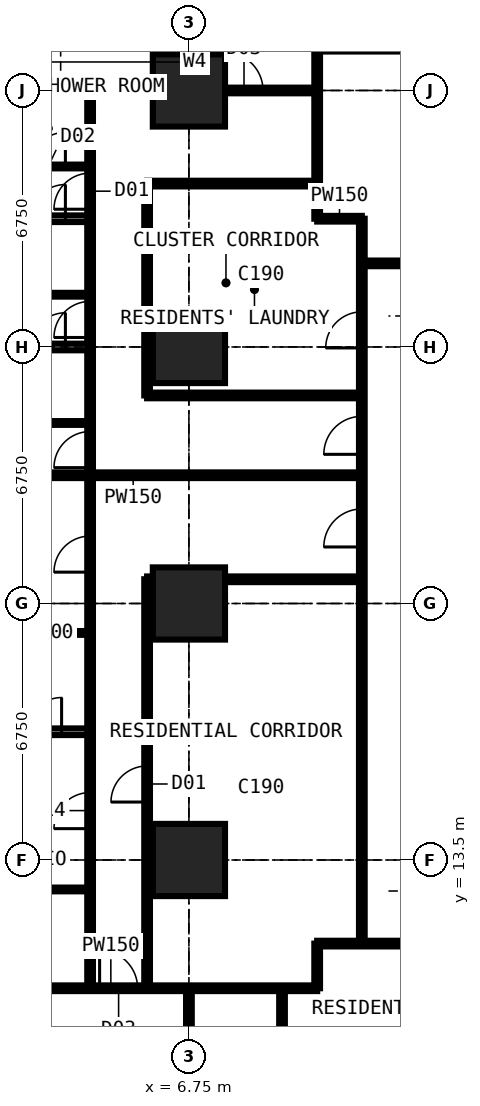
"""IFC4 building model, lengths in metres.
Left out: names, types, materials, properties, quantities, classifications, styles, units other than length and angle.
Written with IfcOpenShell. Run it as: python <this file> out.ifc"""

import sys

from ifc_helpers import new_model, si_unit, direction, frame, frame_2d, origin, origin_2d, place, context, subcontext, project, spatial, rectangle, extrude, element, fill, save


model = new_model("IFC4")
c1 = context("Model", 3, precision=1e-05, world=origin(), true_north=direction((0.0, 1.0)))
c2 = subcontext(c1, "Body", "Model", "MODEL_VIEW")
j1 = project(units=[si_unit("LENGTHUNIT", "METRE"), si_unit("PLANEANGLEUNIT", "RADIAN")], contexts=[c1])
p1 = place(None, origin())
s1 = spatial("IfcSite", under=j1, at=p1, CompositionType="ELEMENT")
p2 = place(p1, origin())
s2 = spatial("IfcBuilding", under=s1, at=p2, CompositionType="ELEMENT")
p3 = place(p2, frame((0.0, 0.0, 43.2)))
s3 = spatial("IfcBuildingStorey", under=s2, at=p3, CompositionType="ELEMENT", Elevation=43.2)
for number, where, z_axis, x_axis in (
    (1, (6.75, 13.5, 0.0), (0.0, 0.0, 1.0), (1.0, 0.0, 0.0)),
    (2, (6.75, 20.25, 0.0), (0.0, 0.0, 1.0), (1.0, 0.0, 0.0)),
    (3, (6.75, 27.0, 0.0), (0.0, 0.0, 1.0), (1.0, 0.0, 0.0)),
    (4, (6.75, 33.75, 0.0), (0.0, 0.0, 1.0), (1.0, 0.0, 0.0)),
):
    element("IfcColumn", number, at=place(p3, frame(where, z_axis=z_axis, x_axis=x_axis)), inside=s3, PredefinedType="COLUMN", context=c2, shape_type="SweptSolid", body=[
        extrude(rectangle(XDim=1.9, YDim=1.9, at=origin_2d()), origin(), (0.0, 0.0, 1.0), 3.6),
    ])
p4 = place(p3, frame((-0.734, 10.125, 0.0), z_axis=(0.0, 0.0, 1.0), x_axis=(1.0, 0.0, 0.0)))
e5 = element("IfcWall", 5, at=p4, inside=s3, PredefinedType="PARTITIONING", context=c2, shape_type="SweptSolid", body=[
    extrude(rectangle(XDim=10.859, YDim=0.15, at=frame_2d((5.429, 0.0))), origin(), (0.0, 0.0, 1.0), 3.375),
])
p5 = place(p4, frame((5.134, 0.0, 0.0)))
e6 = element("IfcOpeningElement", 6, at=p5, cuts=e5, PredefinedType="OPENING", context=c2, shape_type="SweptSolid", body=[
    extrude(rectangle(XDim=1.0, YDim=2.2, at=frame_2d((0.5, 1.1))), frame((0.0, 0.085, 0.0), z_axis=(0.0, -1.0, 0.0), x_axis=(1.0, 0.0, 0.0)), (0.0, 0.0, 1.0), 0.17),
])
p6 = place(p3, frame((-0.734, 16.875, 0.0), z_axis=(0.0, 0.0, 1.0), x_axis=(1.0, 0.0, 0.0)))
e7 = element("IfcWall", 7, at=p6, inside=s3, PredefinedType="PARTITIONING", context=c2, shape_type="SweptSolid", body=[
    extrude(rectangle(XDim=4.884, YDim=0.175, at=frame_2d((2.442, 0.0))), origin(), (0.0, 0.0, 1.0), 3.375),
])
p7 = place(p6, frame((3.234, 0.0, 0.0)))
e8 = element("IfcOpeningElement", 8, at=p7, cuts=e7, PredefinedType="OPENING", context=c2, shape_type="SweptSolid", body=[
    extrude(rectangle(XDim=0.9, YDim=2.2, at=frame_2d((0.45, 1.1))), frame((0.0, 0.097, 0.0), z_axis=(0.0, -1.0, 0.0), x_axis=(1.0, 0.0, 0.0)), (0.0, 0.0, 1.0), 0.195),
])
p8 = place(p3, frame((-0.734, 23.625, 0.0), z_axis=(0.0, 0.0, 1.0), x_axis=(1.0, 0.0, 0.0)))
e9 = element("IfcWall", 9, at=p8, inside=s3, PredefinedType="PARTITIONING", context=c2, shape_type="SweptSolid", body=[
    extrude(rectangle(XDim=12.034, YDim=0.15, at=frame_2d((6.017, 0.0))), origin(), (0.0, 0.0, 1.0), 3.375),
])
p9 = place(p3, frame((-0.734, 27.0, 0.0), z_axis=(0.0, 0.0, 1.0), x_axis=(1.0, 0.0, 0.0)))
e10 = element("IfcWall", 10, at=p9, inside=s3, PredefinedType="PARTITIONING", context=c2, shape_type="SweptSolid", body=[
    extrude(rectangle(XDim=4.884, YDim=0.175, at=frame_2d((2.442, 0.0))), origin(), (0.0, 0.0, 1.0), 2.61),
])
p10 = place(p9, frame((3.334, 0.0, 0.0)))
e11 = element("IfcOpeningElement", 11, at=p10, cuts=e10, PredefinedType="OPENING", context=c2, shape_type="SweptSolid", body=[
    extrude(rectangle(XDim=0.9, YDim=2.2, at=frame_2d((0.45, 1.1))), frame((0.0, 0.097, 0.0), z_axis=(0.0, -1.0, 0.0), x_axis=(1.0, 0.0, 0.0)), (0.0, 0.0, 1.0), 0.195),
])
p11 = place(p3, frame((-0.734, 30.375, 0.0), z_axis=(0.0, 0.0, 1.0), x_axis=(1.0, 0.0, 0.0)))
e12 = element("IfcWall", 12, at=p11, inside=s3, PredefinedType="PARTITIONING", context=c2, shape_type="SweptSolid", body=[
    extrude(rectangle(XDim=4.884, YDim=0.175, at=frame_2d((2.442, 0.0))), origin(), (0.0, 0.0, 1.0), 3.375),
])
p12 = place(p11, frame((3.334, 0.0, 0.0)))
e13 = element("IfcOpeningElement", 13, at=p12, cuts=e12, PredefinedType="OPENING", context=c2, shape_type="SweptSolid", body=[
    extrude(rectangle(XDim=0.9, YDim=2.2, at=frame_2d((0.45, 1.1))), frame((0.0, 0.097, 0.0), z_axis=(0.0, -1.0, 0.0), x_axis=(1.0, 0.0, 0.0)), (0.0, 0.0, 1.0), 0.195),
])
p13 = place(p3, frame((-0.734, 33.75, 0.0), z_axis=(0.0, 0.0, 1.0), x_axis=(1.0, 0.0, 0.0)))
e14 = element("IfcWall", 14, at=p13, inside=s3, PredefinedType="PARTITIONING", context=c2, shape_type="SweptSolid", body=[
    extrude(rectangle(XDim=10.859, YDim=0.15, at=frame_2d((5.429, 0.0))), origin(), (0.0, 0.0, 1.0), 2.877),
])
p14 = place(p13, frame((8.434, 0.0, 0.0)))
e15 = element("IfcOpeningElement", 15, at=p14, cuts=e14, PredefinedType="OPENING", context=c2, shape_type="SweptSolid", body=[
    extrude(rectangle(XDim=1.0, YDim=2.2, at=frame_2d((0.5, 1.1))), frame((0.0, 0.085, 0.0), z_axis=(0.0, -1.0, 0.0), x_axis=(1.0, 0.0, 0.0)), (0.0, 0.0, 1.0), 0.17),
])
for number, where, z_axis, x_axis in (
    (16, (1.75, 12.725, 0.0), (0.0, 0.0, 1.0), (1.0, 0.0, 0.0)),
    (17, (1.75, 19.475, 0.0), (0.0, 0.0, 1.0), (1.0, 0.0, 0.0)),
):
    element("IfcWall", number, at=place(p3, frame(where, z_axis=z_axis, x_axis=x_axis)), inside=s3, PredefinedType="PARTITIONING", context=c2, shape_type="SweptSolid", body=[
        extrude(rectangle(XDim=2.4, YDim=0.1, at=frame_2d((1.2, 0.0))), origin(), (0.0, 0.0, 1.0), 3.375),
    ])
for number, where, z_axis, x_axis in (
    (18, (1.95, 25.0, 0.0), (0.0, 0.0, 1.0), (1.0, 0.0, 0.0)),
    (19, (1.95, 28.375, 0.0), (0.0, 0.0, 1.0), (1.0, 0.0, 0.0)),
):
    element("IfcWall", number, at=place(p3, frame(where, z_axis=z_axis, x_axis=x_axis)), inside=s3, PredefinedType="PARTITIONING", context=c2, shape_type="SweptSolid", body=[
        extrude(rectangle(XDim=2.2, YDim=0.1, at=frame_2d((1.1, 0.0))), origin(), (0.0, 0.0, 1.0), 3.375),
    ])
p15 = place(p3, frame((1.95, 31.75, 0.0), z_axis=(0.0, 0.0, 1.0), x_axis=(1.0, 0.0, 0.0)))
e20 = element("IfcWall", 20, at=p15, inside=s3, PredefinedType="PARTITIONING", context=c2, shape_type="SweptSolid", body=[
    extrude(rectangle(XDim=2.2, YDim=0.1, at=frame_2d((1.1, 0.0))), origin(), (0.0, 0.0, 1.0), 3.375),
])
p16 = place(p15, frame((0.65, 0.0, 0.0)))
e21 = element("IfcOpeningElement", 21, at=p16, cuts=e20, PredefinedType="OPENING", context=c2, shape_type="SweptSolid", body=[
    extrude(rectangle(XDim=0.9, YDim=2.2, at=frame_2d((0.45, 1.1))), frame((0.0, 0.06, 0.0), z_axis=(0.0, -1.0, 0.0), x_axis=(1.0, 0.0, 0.0)), (0.0, 0.0, 1.0), 0.12),
])
p17 = place(p3, frame((4.15, 10.125, 0.0), z_axis=(0.0, 0.0, 1.0), x_axis=(0.0, 1.0, 0.0)))
e22 = element("IfcWall", 22, at=p17, inside=s3, PredefinedType="PARTITIONING", context=c2, shape_type="SweptSolid", body=[
    extrude(rectangle(XDim=23.625, YDim=0.15, at=frame_2d((11.812, 0.0))), origin(), (0.0, 0.0, 1.0), 3.375),
])
p18 = place(p17, frame((20.5, 0.0, 0.0)))
e23 = element("IfcOpeningElement", 23, at=p18, cuts=e22, PredefinedType="OPENING", context=c2, shape_type="SweptSolid", body=[
    extrude(rectangle(XDim=0.95, YDim=2.2, at=frame_2d((0.475, 1.1))), frame((0.0, 0.085, 0.0), z_axis=(0.0, -1.0, 0.0), x_axis=(1.0, 0.0, 0.0)), (0.0, 0.0, 1.0), 0.17),
])
p19 = place(p17, frame((17.125, 0.0, 0.0)))
e24 = element("IfcOpeningElement", 24, at=p19, cuts=e22, PredefinedType="OPENING", context=c2, shape_type="SweptSolid", body=[
    extrude(rectangle(XDim=0.95, YDim=2.2, at=frame_2d((0.475, 1.1))), frame((0.0, 0.085, 0.0), z_axis=(0.0, -1.0, 0.0), x_axis=(1.0, 0.0, 0.0)), (0.0, 0.0, 1.0), 0.17),
])
p20 = place(p17, frame((13.7, 0.0, 0.0)))
e25 = element("IfcOpeningElement", 25, at=p20, cuts=e22, PredefinedType="OPENING", context=c2, shape_type="SweptSolid", body=[
    extrude(rectangle(XDim=0.95, YDim=2.2, at=frame_2d((0.475, 1.1))), frame((0.0, 0.085, 0.0), z_axis=(0.0, -1.0, 0.0), x_axis=(1.0, 0.0, 0.0)), (0.0, 0.0, 1.0), 0.17),
])
p21 = place(p17, frame((4.2, 0.0, 0.0)))
e26 = element("IfcOpeningElement", 26, at=p21, cuts=e22, PredefinedType="OPENING", context=c2, shape_type="SweptSolid", body=[
    extrude(rectangle(XDim=0.95, YDim=2.2, at=frame_2d((0.475, 1.1))), frame((0.0, 0.085, 0.0), z_axis=(0.0, -1.0, 0.0), x_axis=(1.0, 0.0, 0.0)), (0.0, 0.0, 1.0), 0.17),
])
p22 = place(p17, frame((10.95, 0.0, 0.0)))
e27 = element("IfcOpeningElement", 27, at=p22, cuts=e22, PredefinedType="OPENING", context=c2, shape_type="SweptSolid", body=[
    extrude(rectangle(XDim=0.95, YDim=2.2, at=frame_2d((0.475, 1.1))), frame((0.0, 0.085, 0.0), z_axis=(0.0, -1.0, 0.0), x_axis=(1.0, 0.0, 0.0)), (0.0, 0.0, 1.0), 0.17),
])
p23 = place(p3, frame((5.65, 10.125, 0.0), z_axis=(0.0, 0.0, 1.0), x_axis=(0.0, 1.0, 0.0)))
e28 = element("IfcWall", 28, at=p23, inside=s3, PredefinedType="PARTITIONING", context=c2, shape_type="SweptSolid", body=[
    extrude(rectangle(XDim=10.762, YDim=0.15, at=frame_2d((5.381, 0.0))), origin(), (0.0, 0.0, 1.0), 3.375),
])
p24 = place(p23, frame((4.9, 0.0, 0.0)))
e29 = element("IfcOpeningElement", 29, at=p24, cuts=e28, PredefinedType="OPENING", context=c2, shape_type="SweptSolid", body=[
    extrude(rectangle(XDim=0.95, YDim=2.2, at=frame_2d((0.475, 1.1))), frame((0.0, 0.085, 0.0), z_axis=(0.0, -1.0, 0.0), x_axis=(1.0, 0.0, 0.0)), (0.0, 0.0, 1.0), 0.17),
])
p25 = place(p3, frame((5.65, 20.887, 0.0), z_axis=(0.0, 0.0, 1.0), x_axis=(1.0, 0.0, 0.0)))
e30 = element("IfcWall", 30, at=p25, inside=s3, PredefinedType="PARTITIONING", context=c2, shape_type="SweptSolid", body=[
    extrude(rectangle(XDim=5.65, YDim=0.15, at=frame_2d((2.825, 0.0))), origin(), (0.0, 0.0, 1.0), 3.375),
])
p26 = place(p3, frame((5.65, 25.725, 0.0), z_axis=(0.0, 0.0, 1.0), x_axis=(0.0, 1.0, 0.0)))
e31 = element("IfcWall", 31, at=p26, inside=s3, PredefinedType="PARTITIONING", context=c2, shape_type="SweptSolid", body=[
    extrude(rectangle(XDim=5.575, YDim=0.15, at=frame_2d((2.788, 0.0))), origin(), (0.0, 0.0, 1.0), 3.375),
])
p27 = place(p3, frame((5.65, 25.725, 0.0), z_axis=(0.0, 0.0, 1.0), x_axis=(1.0, 0.0, 0.0)))
e32 = element("IfcWall", 32, at=p27, inside=s3, PredefinedType="PARTITIONING", context=c2, shape_type="SweptSolid", body=[
    extrude(rectangle(XDim=5.65, YDim=0.15, at=frame_2d((2.825, 0.0))), origin(), (0.0, 0.0, 1.0), 3.375),
])
p28 = place(p3, frame((5.65, 31.3, 0.0), z_axis=(0.0, 0.0, 1.0), x_axis=(1.0, 0.0, 0.0)))
e33 = element("IfcWall", 33, at=p28, inside=s3, PredefinedType="PARTITIONING", context=c2, shape_type="SweptSolid", body=[
    extrude(rectangle(XDim=4.475, YDim=0.15, at=frame_2d((2.238, 0.0))), origin(), (0.0, 0.0, 1.0), 3.375),
])
p29 = place(p3, frame((6.75, -0.734, 0.0), z_axis=(0.0, 0.0, 1.0), x_axis=(0.0, 1.0, 0.0)))
e34 = element("IfcWall", 34, at=p29, inside=s3, PredefinedType="PARTITIONING", context=c2, shape_type="SweptSolid", body=[
    extrude(rectangle(XDim=10.859, YDim=0.15, at=frame_2d((5.429, 0.0))), origin(), (0.0, 0.0, 1.0), 2.877),
])
p30 = place(p3, frame((9.2, 5.65, 0.0), z_axis=(0.0, 0.0, 1.0), x_axis=(0.0, 1.0, 0.0)))
e35 = element("IfcWall", 35, at=p30, inside=s3, PredefinedType="PARTITIONING", context=c2, shape_type="SweptSolid", body=[
    extrude(rectangle(XDim=4.475, YDim=0.15, at=frame_2d((2.238, 0.0))), origin(), (0.0, 0.0, 1.0), 3.375),
])
p31 = place(p3, frame((10.125, 10.125, 0.0), z_axis=(0.0, 0.0, 1.0), x_axis=(0.0, 1.0, 0.0)))
e36 = element("IfcWall", 36, at=p31, inside=s3, PredefinedType="PARTITIONING", context=c2, shape_type="SweptSolid", body=[
    extrude(rectangle(XDim=1.175, YDim=0.15, at=frame_2d((0.587, 0.0))), origin(), (0.0, 0.0, 1.0), 3.375),
])
p32 = place(p3, frame((10.125, 11.3, 0.0), z_axis=(0.0, 0.0, 1.0), x_axis=(1.0, 0.0, 0.0)))
e37 = element("IfcWall", 37, at=p32, inside=s3, PredefinedType="PARTITIONING", context=c2, shape_type="SweptSolid", body=[
    extrude(rectangle(XDim=20.675, YDim=0.15, at=frame_2d((10.337, 0.0))), origin(), (0.0, 0.0, 1.0), 3.375),
])
p33 = place(p32, frame((8.375, 0.0, 0.0)))
e38 = element("IfcOpeningElement", 38, at=p33, cuts=e37, PredefinedType="OPENING", context=c2, shape_type="SweptSolid", body=[
    extrude(rectangle(XDim=1.0, YDim=2.2, at=frame_2d((0.5, 1.1))), frame((0.0, 0.085, 0.0), z_axis=(0.0, -1.0, 0.0), x_axis=(1.0, 0.0, 0.0)), (0.0, 0.0, 1.0), 0.17),
])
p34 = place(p32, frame((10.975, 0.0, 0.0)))
e39 = element("IfcOpeningElement", 39, at=p34, cuts=e37, PredefinedType="OPENING", context=c2, shape_type="SweptSolid", body=[
    extrude(rectangle(XDim=1.0, YDim=2.2, at=frame_2d((0.5, 1.1))), frame((0.0, 0.085, 0.0), z_axis=(0.0, -1.0, 0.0), x_axis=(1.0, 0.0, 0.0)), (0.0, 0.0, 1.0), 0.17),
])
p35 = place(p32, frame((3.925, 0.0, 0.0)))
e40 = element("IfcOpeningElement", 40, at=p35, cuts=e37, PredefinedType="OPENING", context=c2, shape_type="SweptSolid", body=[
    extrude(rectangle(XDim=0.95, YDim=2.2, at=frame_2d((0.475, 1.1))), frame((0.0, 0.085, 0.0), z_axis=(0.0, -1.0, 0.0), x_axis=(1.0, 0.0, 0.0)), (0.0, 0.0, 1.0), 0.17),
])
p36 = place(p3, frame((10.125, 30.375, 0.0), z_axis=(0.0, 0.0, 1.0), x_axis=(0.0, 1.0, 0.0)))
e41 = element("IfcWall", 41, at=p36, inside=s3, PredefinedType="PARTITIONING", context=c2, shape_type="SweptSolid", body=[
    extrude(rectangle(XDim=10.859, YDim=0.15, at=frame_2d((5.429, 0.0))), origin(), (0.0, 0.0, 1.0), 3.375),
])
p37 = place(p3, frame((10.125, 30.375, 0.0), z_axis=(0.0, 0.0, 1.0), x_axis=(1.0, 0.0, 0.0)))
e42 = element("IfcWall", 42, at=p37, inside=s3, PredefinedType="PARTITIONING", context=c2, shape_type="SweptSolid", body=[
    extrude(rectangle(XDim=1.175, YDim=0.15, at=frame_2d((0.587, 0.0))), origin(), (0.0, 0.0, 1.0), 3.375),
])
p38 = place(p3, frame((11.3, 11.3, 0.0), z_axis=(0.0, 0.0, 1.0), x_axis=(0.0, 1.0, 0.0)))
e43 = element("IfcWall", 43, at=p38, inside=s3, PredefinedType="PARTITIONING", context=c2, shape_type="SweptSolid", body=[
    extrude(rectangle(XDim=19.075, YDim=0.15, at=frame_2d((9.538, 0.0))), origin(), (0.0, 0.0, 1.0), 3.375),
])
p39 = place(p38, frame((12.875, 0.0, 0.0)))
e44 = element("IfcOpeningElement", 44, at=p39, cuts=e43, PredefinedType="OPENING", context=c2, shape_type="SweptSolid", body=[
    extrude(rectangle(XDim=1.0, YDim=2.2, at=frame_2d((0.5, 1.1))), frame((0.0, 0.085, 0.0), z_axis=(0.0, -1.0, 0.0), x_axis=(1.0, 0.0, 0.0)), (0.0, 0.0, 1.0), 0.17),
])
p40 = place(p38, frame((10.438, 0.0, 0.0)))
e45 = element("IfcOpeningElement", 45, at=p40, cuts=e43, PredefinedType="OPENING", context=c2, shape_type="SweptSolid", body=[
    extrude(rectangle(XDim=1.0, YDim=2.2, at=frame_2d((0.5, 1.1))), frame((0.0, 0.085, 0.0), z_axis=(0.0, -1.0, 0.0), x_axis=(1.0, 0.0, 0.0)), (0.0, 0.0, 1.0), 0.17),
])
p41 = place(p38, frame((15.675, 0.0, 0.0)))
e46 = element("IfcOpeningElement", 46, at=p41, cuts=e43, PredefinedType="OPENING", context=c2, shape_type="SweptSolid", body=[
    extrude(rectangle(XDim=0.95, YDim=2.2, at=frame_2d((0.475, 1.1))), frame((0.0, 0.085, 0.0), z_axis=(0.0, -1.0, 0.0), x_axis=(1.0, 0.0, 0.0)), (0.0, 0.0, 1.0), 0.17),
])
p42 = place(p3, frame((11.3, 29.2, 0.0), z_axis=(0.0, 0.0, 1.0), x_axis=(1.0, 0.0, 0.0)))
e47 = element("IfcWall", 47, at=p42, inside=s3, PredefinedType="PARTITIONING", context=c2, shape_type="SweptSolid", body=[
    extrude(rectangle(XDim=19.075, YDim=0.15, at=frame_2d((9.538, 0.0))), origin(), (0.0, 0.0, 1.0), 3.375),
])
p43 = place(p42, frame((12.875, 0.0, 0.0)))
e48 = element("IfcOpeningElement", 48, at=p43, cuts=e47, PredefinedType="OPENING", context=c2, shape_type="SweptSolid", body=[
    extrude(rectangle(XDim=1.0, YDim=2.2, at=frame_2d((0.5, 1.1))), frame((0.0, 0.085, 0.0), z_axis=(0.0, -1.0, 0.0), x_axis=(1.0, 0.0, 0.0)), (0.0, 0.0, 1.0), 0.17),
])
p44 = place(p42, frame((10.438, 0.0, 0.0)))
e49 = element("IfcOpeningElement", 49, at=p44, cuts=e47, PredefinedType="OPENING", context=c2, shape_type="SweptSolid", body=[
    extrude(rectangle(XDim=1.0, YDim=2.2, at=frame_2d((0.5, 1.1))), frame((0.0, 0.085, 0.0), z_axis=(0.0, -1.0, 0.0), x_axis=(1.0, 0.0, 0.0)), (0.0, 0.0, 1.0), 0.17),
])
p45 = place(p42, frame((14.875, 0.0, 0.0)))
e50 = element("IfcOpeningElement", 50, at=p45, cuts=e47, PredefinedType="OPENING", context=c2, shape_type="SweptSolid", body=[
    extrude(rectangle(XDim=0.95, YDim=2.2, at=frame_2d((0.475, 1.1))), frame((0.0, 0.085, 0.0), z_axis=(0.0, -1.0, 0.0), x_axis=(1.0, 0.0, 0.0)), (0.0, 0.0, 1.0), 0.17),
])
p46 = place(p5, origin())
e51 = element("IfcDoor", 51, at=p46, inside=s3, OperationType="SINGLE_SWING_LEFT", PredefinedType="DOOR", context=c2, shape_type="SweptSolid", body=[
    extrude(rectangle(XDim=1.0, YDim=2.2, at=frame_2d((0.5, 1.1))), frame((0.0, 0.025, 0.0), z_axis=(0.0, -1.0, 0.0), x_axis=(1.0, 0.0, 0.0)), (0.0, 0.0, 1.0), 0.05),
])
fill(e6, e51)
p47 = place(p14, origin())
e52 = element("IfcDoor", 52, at=p47, inside=s3, OperationType="SINGLE_SWING_LEFT", PredefinedType="DOOR", context=c2, shape_type="SweptSolid", body=[
    extrude(rectangle(XDim=1.0, YDim=2.2, at=frame_2d((0.5, 1.1))), frame((0.0, 0.025, 0.0), z_axis=(0.0, -1.0, 0.0), x_axis=(1.0, 0.0, 0.0)), (0.0, 0.0, 1.0), 0.05),
])
fill(e15, e52)
p48 = place(p18, origin())
e53 = element("IfcDoor", 53, at=p48, inside=s3, OperationType="SINGLE_SWING_LEFT", PredefinedType="DOOR", context=c2, shape_type="SweptSolid", body=[
    extrude(rectangle(XDim=0.95, YDim=2.2, at=frame_2d((0.475, 1.1))), frame((0.0, 0.025, 0.0), z_axis=(0.0, -1.0, 0.0), x_axis=(1.0, 0.0, 0.0)), (0.0, 0.0, 1.0), 0.05),
])
fill(e23, e53)
p49 = place(p16, origin())
e54 = element("IfcDoor", 54, at=p49, inside=s3, OperationType="SINGLE_SWING_RIGHT", PredefinedType="DOOR", context=c2, shape_type="SweptSolid", body=[
    extrude(rectangle(XDim=0.9, YDim=2.2, at=frame_2d((0.45, 1.1))), frame((0.0, 0.025, 0.0), z_axis=(0.0, -1.0, 0.0), x_axis=(1.0, 0.0, 0.0)), (0.0, 0.0, 1.0), 0.05),
])
fill(e21, e54)
p50 = place(p19, origin())
e55 = element("IfcDoor", 55, at=p50, inside=s3, OperationType="SINGLE_SWING_LEFT", PredefinedType="DOOR", context=c2, shape_type="SweptSolid", body=[
    extrude(rectangle(XDim=0.95, YDim=2.2, at=frame_2d((0.475, 1.1))), frame((0.0, 0.025, 0.0), z_axis=(0.0, -1.0, 0.0), x_axis=(1.0, 0.0, 0.0)), (0.0, 0.0, 1.0), 0.05),
])
fill(e24, e55)
p51 = place(p12, origin())
e56 = element("IfcDoor", 56, at=p51, inside=s3, OperationType="SINGLE_SWING_RIGHT", PredefinedType="DOOR", context=c2, shape_type="SweptSolid", body=[
    extrude(rectangle(XDim=0.9, YDim=2.2, at=frame_2d((0.45, 1.1))), frame((0.0, 0.025, 0.0), z_axis=(0.0, -1.0, 0.0), x_axis=(1.0, 0.0, 0.0)), (0.0, 0.0, 1.0), 0.05),
])
fill(e13, e56)
p52 = place(p20, origin())
e57 = element("IfcDoor", 57, at=p52, inside=s3, OperationType="SINGLE_SWING_LEFT", PredefinedType="DOOR", context=c2, shape_type="SweptSolid", body=[
    extrude(rectangle(XDim=0.95, YDim=2.2, at=frame_2d((0.475, 1.1))), frame((0.0, 0.025, 0.0), z_axis=(0.0, -1.0, 0.0), x_axis=(1.0, 0.0, 0.0)), (0.0, 0.0, 1.0), 0.05),
])
fill(e25, e57)
p53 = place(p10, origin())
e58 = element("IfcDoor", 58, at=p53, inside=s3, OperationType="SINGLE_SWING_RIGHT", PredefinedType="DOOR", context=c2, shape_type="SweptSolid", body=[
    extrude(rectangle(XDim=0.9, YDim=2.2, at=frame_2d((0.45, 1.1))), frame((0.0, 0.025, 0.0), z_axis=(0.0, -1.0, 0.0), x_axis=(1.0, 0.0, 0.0)), (0.0, 0.0, 1.0), 0.05),
])
fill(e11, e58)
p54 = place(p39, origin())
e59 = element("IfcDoor", 59, at=p54, inside=s3, OperationType="SINGLE_SWING_LEFT", PredefinedType="DOOR", context=c2, shape_type="SweptSolid", body=[
    extrude(rectangle(XDim=1.0, YDim=2.2, at=frame_2d((0.5, 1.1))), frame((0.0, 0.025, 0.0), z_axis=(0.0, -1.0, 0.0), x_axis=(1.0, 0.0, 0.0)), (0.0, 0.0, 1.0), 0.05),
])
fill(e44, e59)
p55 = place(p21, origin())
e60 = element("IfcDoor", 60, at=p55, inside=s3, OperationType="SINGLE_SWING_LEFT", PredefinedType="DOOR", context=c2, shape_type="SweptSolid", body=[
    extrude(rectangle(XDim=0.95, YDim=2.2, at=frame_2d((0.475, 1.1))), frame((0.0, 0.025, 0.0), z_axis=(0.0, -1.0, 0.0), x_axis=(1.0, 0.0, 0.0)), (0.0, 0.0, 1.0), 0.05),
])
fill(e26, e60)
p56 = place(p22, origin())
e61 = element("IfcDoor", 61, at=p56, inside=s3, OperationType="SINGLE_SWING_LEFT", PredefinedType="DOOR", context=c2, shape_type="SweptSolid", body=[
    extrude(rectangle(XDim=0.95, YDim=2.2, at=frame_2d((0.475, 1.1))), frame((0.0, 0.025, 0.0), z_axis=(0.0, -1.0, 0.0), x_axis=(1.0, 0.0, 0.0)), (0.0, 0.0, 1.0), 0.05),
])
fill(e27, e61)
p57 = place(p7, origin())
e62 = element("IfcDoor", 62, at=p57, inside=s3, OperationType="SINGLE_SWING_RIGHT", PredefinedType="DOOR", context=c2, shape_type="SweptSolid", body=[
    extrude(rectangle(XDim=0.9, YDim=2.2, at=frame_2d((0.45, 1.1))), frame((0.0, 0.025, 0.0), z_axis=(0.0, -1.0, 0.0), x_axis=(1.0, 0.0, 0.0)), (0.0, 0.0, 1.0), 0.05),
])
fill(e8, e62)
p58 = place(p40, origin())
e63 = element("IfcDoor", 63, at=p58, inside=s3, OperationType="SINGLE_SWING_LEFT", PredefinedType="DOOR", context=c2, shape_type="SweptSolid", body=[
    extrude(rectangle(XDim=1.0, YDim=2.2, at=frame_2d((0.5, 1.1))), frame((0.0, 0.025, 0.0), z_axis=(0.0, -1.0, 0.0), x_axis=(1.0, 0.0, 0.0)), (0.0, 0.0, 1.0), 0.05),
])
fill(e45, e63)
p59 = place(p41, origin())
e64 = element("IfcDoor", 64, at=p59, inside=s3, OperationType="SINGLE_SWING_LEFT", PredefinedType="DOOR", context=c2, shape_type="SweptSolid", body=[
    extrude(rectangle(XDim=0.95, YDim=2.2, at=frame_2d((0.475, 1.1))), frame((0.0, 0.025, 0.0), z_axis=(0.0, -1.0, 0.0), x_axis=(1.0, 0.0, 0.0)), (0.0, 0.0, 1.0), 0.05),
])
fill(e46, e64)
p60 = place(p24, origin())
e65 = element("IfcDoor", 65, at=p60, inside=s3, OperationType="SINGLE_SWING_LEFT", PredefinedType="DOOR", context=c2, shape_type="SweptSolid", body=[
    extrude(rectangle(XDim=0.95, YDim=2.2, at=frame_2d((0.475, 1.1))), frame((0.0, 0.025, 0.0), z_axis=(0.0, -1.0, 0.0), x_axis=(1.0, 0.0, 0.0)), (0.0, 0.0, 1.0), 0.05),
])
fill(e29, e65)
save(model, sys.argv[1])
